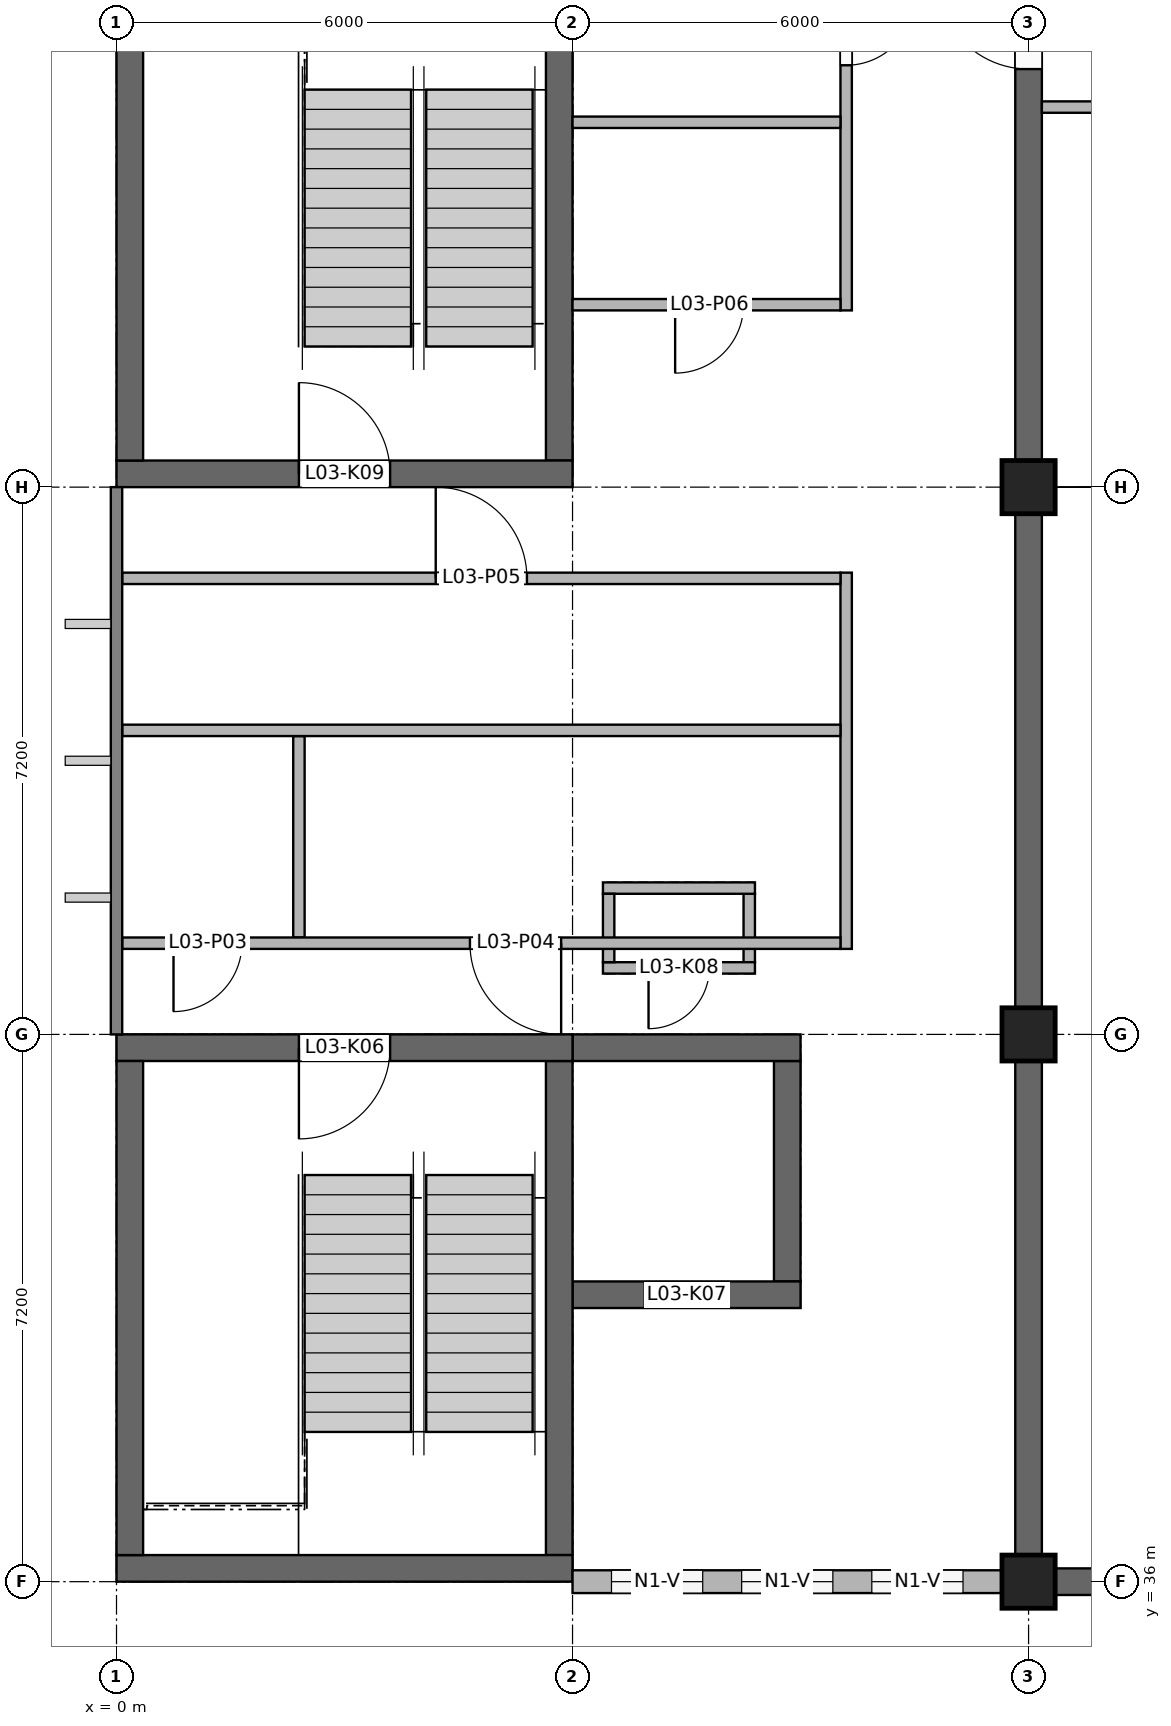
"""IFC4 building model, lengths in metres.
Left out: names, types, materials, properties, quantities, classifications, styles, units other than length and angle.
Written with IfcOpenShell. Run it as: python <this file> out.ifc"""

import sys

from ifc_helpers import new_model, si_unit, direction, frame, frame_2d, origin, origin_2d, place, context, subcontext, project, spatial, rectangle, extrude, element, fill, save


model = new_model("IFC4")
c1 = context("Model", 3, precision=1e-05, world=origin(), true_north=direction((0.0, 1.0)))
c2 = subcontext(c1, "Body", "Model", "MODEL_VIEW")
j1 = project(units=[si_unit("LENGTHUNIT", "METRE"), si_unit("PLANEANGLEUNIT", "RADIAN")], contexts=[c1])
p1 = place(None, origin())
s1 = spatial("IfcSite", under=j1, at=p1, CompositionType="ELEMENT")
p2 = place(p1, origin())
s2 = spatial("IfcBuilding", under=s1, at=p2, CompositionType="ELEMENT")
p3 = place(p2, frame((0.0, 0.0, 12.6)))
s3 = spatial("IfcBuildingStorey", under=s2, at=p3, CompositionType="ELEMENT", Elevation=12.6)
p4 = place(p3, frame((0.0, 36.175, 0.0), z_axis=(0.0, 0.0, 1.0), x_axis=(1.0, 0.0, 0.0)))
e1 = element("IfcWall", 1, at=p4, inside=s3, PredefinedType="SHEAR", context=c2, shape_type="SweptSolid", body=[
    extrude(rectangle(XDim=6.0, YDim=0.35, at=frame_2d((3.0, 0.0))), origin(), (0.0, 0.0, 1.0), 4.0),
])
p5 = place(p3, frame((0.0, 43.025, 0.0), z_axis=(0.0, 0.0, 1.0), x_axis=(1.0, 0.0, 0.0)))
e2 = element("IfcWall", 2, at=p5, inside=s3, PredefinedType="SHEAR", context=c2, shape_type="SweptSolid", body=[
    extrude(rectangle(XDim=6.0, YDim=0.35, at=frame_2d((3.0, 0.0))), origin(), (0.0, 0.0, 1.0), 4.0),
])
p6 = place(p5, frame((2.4, 0.0, 0.0)))
e3 = element("IfcOpeningElement", 3, at=p6, cuts=e2, PredefinedType="OPENING", context=c2, shape_type="SweptSolid", body=[
    extrude(rectangle(XDim=1.2, YDim=2.1, at=frame_2d((0.6, 1.05))), frame((0.0, 0.185, 0.0), z_axis=(0.0, -1.0, 0.0), x_axis=(1.0, 0.0, 0.0)), (0.0, 0.0, 1.0), 0.37),
])
for number, where, z_axis, x_axis in (
    (4, (0.175, 36.35, 0.0), (0.0, 0.0, 1.0), (0.0, 1.0, 0.0)),
    (5, (5.825, 36.35, 0.0), (0.0, 0.0, 1.0), (0.0, 1.0, 0.0)),
):
    element("IfcWall", number, at=place(p3, frame(where, z_axis=z_axis, x_axis=x_axis)), inside=s3, PredefinedType="SHEAR", context=c2, shape_type="SweptSolid", body=[
        extrude(rectangle(XDim=6.5, YDim=0.35, at=frame_2d((3.25, 0.0))), origin(), (0.0, 0.0, 1.0), 4.0),
    ])
p7 = place(p3, frame((6.0, 39.775, 0.0), z_axis=(0.0, 0.0, 1.0), x_axis=(1.0, 0.0, 0.0)))
e6 = element("IfcWall", 6, at=p7, inside=s3, PredefinedType="SHEAR", context=c2, shape_type="SweptSolid", body=[
    extrude(rectangle(XDim=3.0, YDim=0.35, at=frame_2d((1.5, 0.0))), origin(), (0.0, 0.0, 1.0), 4.2),
])
p8 = place(p7, frame((0.95, 0.0, 0.0)))
e7 = element("IfcOpeningElement", 7, at=p8, cuts=e6, PredefinedType="OPENING", context=c2, shape_type="SweptSolid", body=[
    extrude(rectangle(XDim=1.1, YDim=2.1, at=frame_2d((0.55, 1.05))), frame((0.0, 0.185, 0.0), z_axis=(0.0, -1.0, 0.0), x_axis=(1.0, 0.0, 0.0)), (0.0, 0.0, 1.0), 0.37),
])
p9 = place(p3, frame((6.0, 43.025, 0.0), z_axis=(0.0, 0.0, 1.0), x_axis=(1.0, 0.0, 0.0)))
e8 = element("IfcWall", 8, at=p9, inside=s3, PredefinedType="SHEAR", context=c2, shape_type="SweptSolid", body=[
    extrude(rectangle(XDim=3.0, YDim=0.35, at=frame_2d((1.5, 0.0))), origin(), (0.0, 0.0, 1.0), 4.2),
])
p10 = place(p3, frame((8.825, 39.95, 0.0), z_axis=(0.0, 0.0, 1.0), x_axis=(0.0, 1.0, 0.0)))
e9 = element("IfcWall", 9, at=p10, inside=s3, PredefinedType="SHEAR", context=c2, shape_type="SweptSolid", body=[
    extrude(rectangle(XDim=2.9, YDim=0.35, at=frame_2d((1.45, 0.0))), origin(), (0.0, 0.0, 1.0), 4.2),
])
p11 = place(p3, frame((0.0, 50.575, 0.0), z_axis=(0.0, 0.0, 1.0), x_axis=(1.0, 0.0, 0.0)))
e10 = element("IfcWall", 10, at=p11, inside=s3, PredefinedType="SHEAR", context=c2, shape_type="SweptSolid", body=[
    extrude(rectangle(XDim=6.0, YDim=0.35, at=frame_2d((3.0, 0.0))), origin(), (0.0, 0.0, 1.0), 4.0),
])
p12 = place(p11, frame((2.4, 0.0, 0.0)))
e11 = element("IfcOpeningElement", 11, at=p12, cuts=e10, PredefinedType="OPENING", context=c2, shape_type="SweptSolid", body=[
    extrude(rectangle(XDim=1.2, YDim=2.1, at=frame_2d((0.6, 1.05))), frame((0.0, 0.185, 0.0), z_axis=(0.0, -1.0, 0.0), x_axis=(1.0, 0.0, 0.0)), (0.0, 0.0, 1.0), 0.37),
])
for number, where, z_axis, x_axis in (
    (12, (0.175, 50.75, 0.0), (0.0, 0.0, 1.0), (0.0, 1.0, 0.0)),
    (13, (5.825, 50.75, 0.0), (0.0, 0.0, 1.0), (0.0, 1.0, 0.0)),
):
    element("IfcWall", number, at=place(p3, frame(where, z_axis=z_axis, x_axis=x_axis)), inside=s3, PredefinedType="SHEAR", context=c2, shape_type="SweptSolid", body=[
        extrude(rectangle(XDim=6.5, YDim=0.35, at=frame_2d((3.25, 0.0))), origin(), (0.0, 0.0, 1.0), 4.0),
    ])
p13 = place(p3, frame((6.4, 44.075, 0.0), z_axis=(0.0, 0.0, 1.0), x_axis=(1.0, 0.0, 0.0)))
e14 = element("IfcWall", 14, at=p13, inside=s3, PredefinedType="SOLIDWALL", context=c2, shape_type="SweptSolid", body=[
    extrude(rectangle(XDim=2.0, YDim=0.15, at=frame_2d((1.0, 0.0))), origin(), (0.0, 0.0, 1.0), 4.2),
])
p14 = place(p13, frame((0.6, 0.0, 0.0)))
e15 = element("IfcOpeningElement", 15, at=p14, cuts=e14, PredefinedType="OPENING", context=c2, shape_type="SweptSolid", body=[
    extrude(rectangle(XDim=0.8, YDim=2.1, at=frame_2d((0.4, 1.05))), frame((0.0, 0.085, 0.0), z_axis=(0.0, -1.0, 0.0), x_axis=(1.0, 0.0, 0.0)), (0.0, 0.0, 1.0), 0.17),
])
p15 = place(p3, frame((6.4, 45.125, 0.0), z_axis=(0.0, 0.0, 1.0), x_axis=(1.0, 0.0, 0.0)))
e16 = element("IfcWall", 16, at=p15, inside=s3, PredefinedType="SOLIDWALL", context=c2, shape_type="SweptSolid", body=[
    extrude(rectangle(XDim=2.0, YDim=0.15, at=frame_2d((1.0, 0.0))), origin(), (0.0, 0.0, 1.0), 4.2),
])
for number, where, z_axis, x_axis in (
    (17, (6.475, 44.15, 0.0), (0.0, 0.0, 1.0), (0.0, 1.0, 0.0)),
    (18, (8.325, 44.15, 0.0), (0.0, 0.0, 1.0), (0.0, 1.0, 0.0)),
):
    element("IfcWall", number, at=place(p3, frame(where, z_axis=z_axis, x_axis=x_axis)), inside=s3, PredefinedType="SOLIDWALL", context=c2, shape_type="SweptSolid", body=[
        extrude(rectangle(XDim=0.9, YDim=0.15, at=frame_2d((0.45, 0.0))), origin(), (0.0, 0.0, 1.0), 4.2),
    ])
for number, where, z_axis, x_axis in (
    (19, (12.0, 36.0, 0.0), (0.0, 0.0, 1.0), (1.0, 0.0, 0.0)),
    (20, (12.0, 43.2, 0.0), (0.0, 0.0, 1.0), (1.0, 0.0, 0.0)),
    (21, (12.0, 50.4, 0.0), (0.0, 0.0, 1.0), (1.0, 0.0, 0.0)),
):
    element("IfcColumn", number, at=place(p3, frame(where, z_axis=z_axis, x_axis=x_axis)), inside=s3, PredefinedType="COLUMN", context=c2, shape_type="SweptSolid", body=[
        extrude(rectangle(XDim=0.7, YDim=0.7, at=origin_2d()), origin(), (0.0, 0.0, 1.0), 4.0),
    ])
for number, where, z_axis, x_axis in (
    (22, (12.0, 36.35, 0.0), (0.0, 0.0, 1.0), (0.0, 1.0, 0.0)),
    (23, (12.0, 43.55, 0.0), (0.0, 0.0, 1.0), (0.0, 1.0, 0.0)),
):
    element("IfcWall", number, at=place(p3, frame(where, z_axis=z_axis, x_axis=x_axis)), inside=s3, PredefinedType="SHEAR", context=c2, shape_type="SweptSolid", body=[
        extrude(rectangle(XDim=6.5, YDim=0.35, at=frame_2d((3.25, 0.0))), origin(), (0.0, 0.0, 1.0), 3.1),
    ])
p16 = place(p3, frame((12.0, 50.75, 0.0), z_axis=(0.0, 0.0, 1.0), x_axis=(0.0, 1.0, 0.0)))
e24 = element("IfcWall", 24, at=p16, inside=s3, PredefinedType="SHEAR", context=c2, shape_type="SweptSolid", body=[
    extrude(rectangle(XDim=6.5, YDim=0.35, at=frame_2d((3.25, 0.0))), origin(), (0.0, 0.0, 1.0), 3.1),
])
p17 = place(p16, frame((5.15, 0.0, 0.0)))
e25 = element("IfcOpeningElement", 25, at=p17, cuts=e24, PredefinedType="OPENING", context=c2, shape_type="SweptSolid", body=[
    extrude(rectangle(XDim=1.2, YDim=2.1, at=frame_2d((0.6, 1.05))), frame((0.0, 0.185, 0.0), z_axis=(0.0, -1.0, 0.0), x_axis=(1.0, 0.0, 0.0)), (0.0, 0.0, 1.0), 0.37),
])
p18 = place(p3, frame((12.35, 36.0, 0.0), z_axis=(0.0, 0.0, 1.0), x_axis=(1.0, 0.0, 0.0)))
e26 = element("IfcWall", 26, at=p18, inside=s3, PredefinedType="SHEAR", context=c2, shape_type="SweptSolid", body=[
    extrude(rectangle(XDim=17.475, YDim=0.35, at=frame_2d((8.737, 0.0))), origin(), (0.0, 0.0, 1.0), 3.158),
])
p19 = place(p3, frame((6.0, 36.0, 0.0), z_axis=(0.0, 0.0, 1.0), x_axis=(1.0, 0.0, 0.0)))
e27 = element("IfcWall", 27, at=p19, inside=s3, PredefinedType="SOLIDWALL", context=c2, shape_type="SweptSolid", body=[
    extrude(rectangle(XDim=5.65, YDim=0.3, at=frame_2d((2.825, 0.0))), origin(), (0.0, 0.0, 1.0), 3.2),
])
p20 = place(p19, frame((0.512, 0.0, 0.9)))
e28 = element("IfcOpeningElement", 28, at=p20, cuts=e27, PredefinedType="OPENING", context=c2, shape_type="SweptSolid", body=[
    extrude(rectangle(XDim=1.2, YDim=1.5, at=frame_2d((0.6, 0.75))), frame((0.0, 0.16, 0.0), z_axis=(0.0, -1.0, 0.0), x_axis=(1.0, 0.0, 0.0)), (0.0, 0.0, 1.0), 0.32),
])
p21 = place(p19, frame((2.225, 0.0, 0.9)))
e29 = element("IfcOpeningElement", 29, at=p21, cuts=e27, PredefinedType="OPENING", context=c2, shape_type="SweptSolid", body=[
    extrude(rectangle(XDim=1.2, YDim=1.5, at=frame_2d((0.6, 0.75))), frame((0.0, 0.16, 0.0), z_axis=(0.0, -1.0, 0.0), x_axis=(1.0, 0.0, 0.0)), (0.0, 0.0, 1.0), 0.32),
])
p22 = place(p19, frame((3.938, 0.0, 0.9)))
e30 = element("IfcOpeningElement", 30, at=p22, cuts=e27, PredefinedType="OPENING", context=c2, shape_type="SweptSolid", body=[
    extrude(rectangle(XDim=1.2, YDim=1.5, at=frame_2d((0.6, 0.75))), frame((0.0, 0.16, 0.0), z_axis=(0.0, -1.0, 0.0), x_axis=(1.0, 0.0, 0.0)), (0.0, 0.0, 1.0), 0.32),
])
p23 = place(p3, frame((2.4, 44.475, 0.0), z_axis=(0.0, 0.0, 1.0), x_axis=(0.0, 1.0, 0.0)))
e31 = element("IfcWall", 31, at=p23, inside=s3, PredefinedType="PARTITIONING", context=c2, shape_type="SweptSolid", body=[
    extrude(rectangle(XDim=2.65, YDim=0.15, at=frame_2d((1.325, 0.0))), origin(), (0.0, 0.0, 1.0), 4.0),
])
p24 = place(p3, frame((9.6, 44.325, 0.0), z_axis=(0.0, 0.0, 1.0), x_axis=(0.0, 1.0, 0.0)))
e32 = element("IfcWall", 32, at=p24, inside=s3, PredefinedType="PARTITIONING", context=c2, shape_type="SweptSolid", body=[
    extrude(rectangle(XDim=4.95, YDim=0.15, at=frame_2d((2.475, 0.0))), origin(), (0.0, 0.0, 1.0), 4.0),
])
p25 = place(p3, frame((9.6, 52.725, 0.0), z_axis=(0.0, 0.0, 1.0), x_axis=(0.0, 1.0, 0.0)))
e33 = element("IfcWall", 33, at=p25, inside=s3, PredefinedType="PARTITIONING", context=c2, shape_type="SweptSolid", body=[
    extrude(rectangle(XDim=4.725, YDim=0.15, at=frame_2d((2.362, 0.0))), origin(), (0.0, 0.0, 1.0), 3.2),
])
p26 = place(p25, frame((3.225, 0.0, 0.0)))
e34 = element("IfcOpeningElement", 34, at=p26, cuts=e33, PredefinedType="OPENING", context=c2, shape_type="SweptSolid", body=[
    extrude(rectangle(XDim=0.9, YDim=2.1, at=frame_2d((0.45, 1.05))), frame((0.0, 0.085, 0.0), z_axis=(0.0, -1.0, 0.0), x_axis=(1.0, 0.0, 0.0)), (0.0, 0.0, 1.0), 0.17),
])
p27 = place(p3, frame((0.075, 44.4, 0.0), z_axis=(0.0, 0.0, 1.0), x_axis=(1.0, 0.0, 0.0)))
e35 = element("IfcWall", 35, at=p27, inside=s3, PredefinedType="PARTITIONING", context=c2, shape_type="SweptSolid", body=[
    extrude(rectangle(XDim=9.45, YDim=0.15, at=frame_2d((4.725, 0.0))), origin(), (0.0, 0.0, 1.0), 4.0),
])
p28 = place(p27, frame((0.675, 0.0, 0.0)))
e36 = element("IfcOpeningElement", 36, at=p28, cuts=e35, PredefinedType="OPENING", context=c2, shape_type="SweptSolid", body=[
    extrude(rectangle(XDim=0.9, YDim=2.1, at=frame_2d((0.45, 1.05))), frame((0.0, 0.085, 0.0), z_axis=(0.0, -1.0, 0.0), x_axis=(1.0, 0.0, 0.0)), (0.0, 0.0, 1.0), 0.17),
])
p29 = place(p27, frame((4.575, 0.0, 0.0)))
e37 = element("IfcOpeningElement", 37, at=p29, cuts=e35, PredefinedType="OPENING", context=c2, shape_type="SweptSolid", body=[
    extrude(rectangle(XDim=1.2, YDim=2.1, at=frame_2d((0.6, 1.05))), frame((0.0, 0.085, 0.0), z_axis=(0.0, -1.0, 0.0), x_axis=(1.0, 0.0, 0.0)), (0.0, 0.0, 1.0), 0.17),
])
p30 = place(p3, frame((0.075, 47.2, 0.0), z_axis=(0.0, 0.0, 1.0), x_axis=(1.0, 0.0, 0.0)))
e38 = element("IfcWall", 38, at=p30, inside=s3, PredefinedType="PARTITIONING", context=c2, shape_type="SweptSolid", body=[
    extrude(rectangle(XDim=9.45, YDim=0.15, at=frame_2d((4.725, 0.0))), origin(), (0.0, 0.0, 1.0), 4.0),
])
p31 = place(p3, frame((0.075, 49.2, 0.0), z_axis=(0.0, 0.0, 1.0), x_axis=(1.0, 0.0, 0.0)))
e39 = element("IfcWall", 39, at=p31, inside=s3, PredefinedType="PARTITIONING", context=c2, shape_type="SweptSolid", body=[
    extrude(rectangle(XDim=9.45, YDim=0.15, at=frame_2d((4.725, 0.0))), origin(), (0.0, 0.0, 1.0), 4.0),
])
p32 = place(p31, frame((4.125, 0.0, 0.0)))
e40 = element("IfcOpeningElement", 40, at=p32, cuts=e39, PredefinedType="OPENING", context=c2, shape_type="SweptSolid", body=[
    extrude(rectangle(XDim=1.2, YDim=2.1, at=frame_2d((0.6, 1.05))), frame((0.0, 0.085, 0.0), z_axis=(0.0, -1.0, 0.0), x_axis=(1.0, 0.0, 0.0)), (0.0, 0.0, 1.0), 0.17),
])
p33 = place(p3, frame((6.0, 52.8, 0.0), z_axis=(0.0, 0.0, 1.0), x_axis=(1.0, 0.0, 0.0)))
e41 = element("IfcWall", 41, at=p33, inside=s3, PredefinedType="PARTITIONING", context=c2, shape_type="SweptSolid", body=[
    extrude(rectangle(XDim=3.525, YDim=0.15, at=frame_2d((1.762, 0.0))), origin(), (0.0, 0.0, 1.0), 4.0),
])
p34 = place(p33, frame((1.35, 0.0, 0.0)))
e42 = element("IfcOpeningElement", 42, at=p34, cuts=e41, PredefinedType="OPENING", context=c2, shape_type="SweptSolid", body=[
    extrude(rectangle(XDim=0.9, YDim=2.1, at=frame_2d((0.45, 1.05))), frame((0.0, 0.085, 0.0), z_axis=(0.0, -1.0, 0.0), x_axis=(1.0, 0.0, 0.0)), (0.0, 0.0, 1.0), 0.17),
])
p35 = place(p3, frame((6.0, 55.2, 0.0), z_axis=(0.0, 0.0, 1.0), x_axis=(1.0, 0.0, 0.0)))
e43 = element("IfcWall", 43, at=p35, inside=s3, PredefinedType="PARTITIONING", context=c2, shape_type="SweptSolid", body=[
    extrude(rectangle(XDim=3.525, YDim=0.15, at=frame_2d((1.762, 0.0))), origin(), (0.0, 0.0, 1.0), 4.0),
])
p36 = place(p3, frame((12.175, 55.4, 0.0), z_axis=(0.0, 0.0, 1.0), x_axis=(1.0, 0.0, 0.0)))
e44 = element("IfcWall", 44, at=p36, inside=s3, PredefinedType="PARTITIONING", context=c2, shape_type="SweptSolid", body=[
    extrude(rectangle(XDim=12.925, YDim=0.15, at=frame_2d((6.462, 0.0))), origin(), (0.0, 0.0, 1.0), 3.1),
])
p37 = place(p36, frame((5.525, 0.0, 0.0)))
e45 = element("IfcOpeningElement", 45, at=p37, cuts=e44, PredefinedType="OPENING", context=c2, shape_type="SweptSolid", body=[
    extrude(rectangle(XDim=1.8, YDim=2.1, at=frame_2d((0.9, 1.05))), frame((0.0, 0.085, 0.0), z_axis=(0.0, -1.0, 0.0), x_axis=(1.0, 0.0, 0.0)), (0.0, 0.0, 1.0), 0.17),
])
p38 = place(p20, origin())
e46 = element("IfcWindow", 46, at=p38, inside=s3, PartitioningType="SINGLE_PANEL", PredefinedType="WINDOW", context=c2, shape_type="SweptSolid", body=[
    extrude(rectangle(XDim=1.2, YDim=1.5, at=frame_2d((0.6, 0.75))), frame((0.0, 0.03, 0.0), z_axis=(0.0, -1.0, 0.0), x_axis=(1.0, 0.0, 0.0)), (0.0, 0.0, 1.0), 0.06),
])
fill(e28, e46)
p39 = place(p21, origin())
e47 = element("IfcWindow", 47, at=p39, inside=s3, PartitioningType="SINGLE_PANEL", PredefinedType="WINDOW", context=c2, shape_type="SweptSolid", body=[
    extrude(rectangle(XDim=1.2, YDim=1.5, at=frame_2d((0.6, 0.75))), frame((0.0, 0.03, 0.0), z_axis=(0.0, -1.0, 0.0), x_axis=(1.0, 0.0, 0.0)), (0.0, 0.0, 1.0), 0.06),
])
fill(e29, e47)
p40 = place(p22, origin())
e48 = element("IfcWindow", 48, at=p40, inside=s3, PartitioningType="SINGLE_PANEL", PredefinedType="WINDOW", context=c2, shape_type="SweptSolid", body=[
    extrude(rectangle(XDim=1.2, YDim=1.5, at=frame_2d((0.6, 0.75))), frame((0.0, 0.03, 0.0), z_axis=(0.0, -1.0, 0.0), x_axis=(1.0, 0.0, 0.0)), (0.0, 0.0, 1.0), 0.06),
])
fill(e30, e48)
p41 = place(p6, frame((1.2, 0.0, 0.0), z_axis=(0.0, 0.0, 1.0), x_axis=(-1.0, 0.0, 0.0)))
e49 = element("IfcDoor", 49, at=p41, inside=s3, OperationType="SINGLE_SWING_RIGHT", PredefinedType="DOOR", context=c2, shape_type="SweptSolid", body=[
    extrude(rectangle(XDim=1.2, YDim=2.1, at=frame_2d((0.6, 1.05))), frame((0.0, 0.025, 0.0), z_axis=(0.0, -1.0, 0.0), x_axis=(1.0, 0.0, 0.0)), (0.0, 0.0, 1.0), 0.05),
])
fill(e3, e49)
p42 = place(p8, origin())
e50 = element("IfcDoor", 50, at=p42, inside=s3, OperationType="DOUBLE_DOOR_SLIDING", PredefinedType="DOOR", context=c2, shape_type="SweptSolid", body=[
    extrude(rectangle(XDim=1.1, YDim=2.1, at=frame_2d((0.55, 1.05))), frame((0.0, 0.025, 0.0), z_axis=(0.0, -1.0, 0.0), x_axis=(1.0, 0.0, 0.0)), (0.0, 0.0, 1.0), 0.05),
])
fill(e7, e50)
p43 = place(p14, frame((0.8, 0.0, 0.0), z_axis=(0.0, 0.0, 1.0), x_axis=(-1.0, 0.0, 0.0)))
e51 = element("IfcDoor", 51, at=p43, inside=s3, OperationType="SINGLE_SWING_RIGHT", PredefinedType="DOOR", context=c2, shape_type="SweptSolid", body=[
    extrude(rectangle(XDim=0.8, YDim=2.1, at=frame_2d((0.4, 1.05))), frame((0.0, 0.025, 0.0), z_axis=(0.0, -1.0, 0.0), x_axis=(1.0, 0.0, 0.0)), (0.0, 0.0, 1.0), 0.05),
])
fill(e15, e51)
p44 = place(p12, origin())
e52 = element("IfcDoor", 52, at=p44, inside=s3, OperationType="SINGLE_SWING_LEFT", PredefinedType="DOOR", context=c2, shape_type="SweptSolid", body=[
    extrude(rectangle(XDim=1.2, YDim=2.1, at=frame_2d((0.6, 1.05))), frame((0.0, 0.025, 0.0), z_axis=(0.0, -1.0, 0.0), x_axis=(1.0, 0.0, 0.0)), (0.0, 0.0, 1.0), 0.05),
])
fill(e11, e52)
p45 = place(p26, frame((0.9, 0.0, 0.0), z_axis=(0.0, 0.0, 1.0), x_axis=(-1.0, 0.0, 0.0)))
e53 = element("IfcDoor", 53, at=p45, inside=s3, OperationType="SINGLE_SWING_LEFT", PredefinedType="DOOR", context=c2, shape_type="SweptSolid", body=[
    extrude(rectangle(XDim=0.9, YDim=2.1, at=frame_2d((0.45, 1.05))), frame((0.0, 0.025, 0.0), z_axis=(0.0, -1.0, 0.0), x_axis=(1.0, 0.0, 0.0)), (0.0, 0.0, 1.0), 0.05),
])
fill(e34, e53)
p46 = place(p17, origin())
e54 = element("IfcDoor", 54, at=p46, inside=s3, OperationType="SINGLE_SWING_RIGHT", PredefinedType="DOOR", context=c2, shape_type="SweptSolid", body=[
    extrude(rectangle(XDim=1.2, YDim=2.1, at=frame_2d((0.6, 1.05))), frame((0.0, 0.025, 0.0), z_axis=(0.0, -1.0, 0.0), x_axis=(1.0, 0.0, 0.0)), (0.0, 0.0, 1.0), 0.05),
])
fill(e25, e54)
p47 = place(p28, frame((0.9, 0.0, 0.0), z_axis=(0.0, 0.0, 1.0), x_axis=(-1.0, 0.0, 0.0)))
e55 = element("IfcDoor", 55, at=p47, inside=s3, OperationType="SINGLE_SWING_RIGHT", PredefinedType="DOOR", context=c2, shape_type="SweptSolid", body=[
    extrude(rectangle(XDim=0.9, YDim=2.1, at=frame_2d((0.45, 1.05))), frame((0.0, 0.025, 0.0), z_axis=(0.0, -1.0, 0.0), x_axis=(1.0, 0.0, 0.0)), (0.0, 0.0, 1.0), 0.05),
])
fill(e36, e55)
p48 = place(p29, frame((1.2, 0.0, 0.0), z_axis=(0.0, 0.0, 1.0), x_axis=(-1.0, 0.0, 0.0)))
e56 = element("IfcDoor", 56, at=p48, inside=s3, OperationType="SINGLE_SWING_LEFT", PredefinedType="DOOR", context=c2, shape_type="SweptSolid", body=[
    extrude(rectangle(XDim=1.2, YDim=2.1, at=frame_2d((0.6, 1.05))), frame((0.0, 0.025, 0.0), z_axis=(0.0, -1.0, 0.0), x_axis=(1.0, 0.0, 0.0)), (0.0, 0.0, 1.0), 0.05),
])
fill(e37, e56)
p49 = place(p32, origin())
e57 = element("IfcDoor", 57, at=p49, inside=s3, OperationType="SINGLE_SWING_LEFT", PredefinedType="DOOR", context=c2, shape_type="SweptSolid", body=[
    extrude(rectangle(XDim=1.2, YDim=2.1, at=frame_2d((0.6, 1.05))), frame((0.0, 0.025, 0.0), z_axis=(0.0, -1.0, 0.0), x_axis=(1.0, 0.0, 0.0)), (0.0, 0.0, 1.0), 0.05),
])
fill(e40, e57)
p50 = place(p34, frame((0.9, 0.0, 0.0), z_axis=(0.0, 0.0, 1.0), x_axis=(-1.0, 0.0, 0.0)))
e58 = element("IfcDoor", 58, at=p50, inside=s3, OperationType="SINGLE_SWING_RIGHT", PredefinedType="DOOR", context=c2, shape_type="SweptSolid", body=[
    extrude(rectangle(XDim=0.9, YDim=2.1, at=frame_2d((0.45, 1.05))), frame((0.0, 0.025, 0.0), z_axis=(0.0, -1.0, 0.0), x_axis=(1.0, 0.0, 0.0)), (0.0, 0.0, 1.0), 0.05),
])
fill(e42, e58)
save(model, sys.argv[1])
